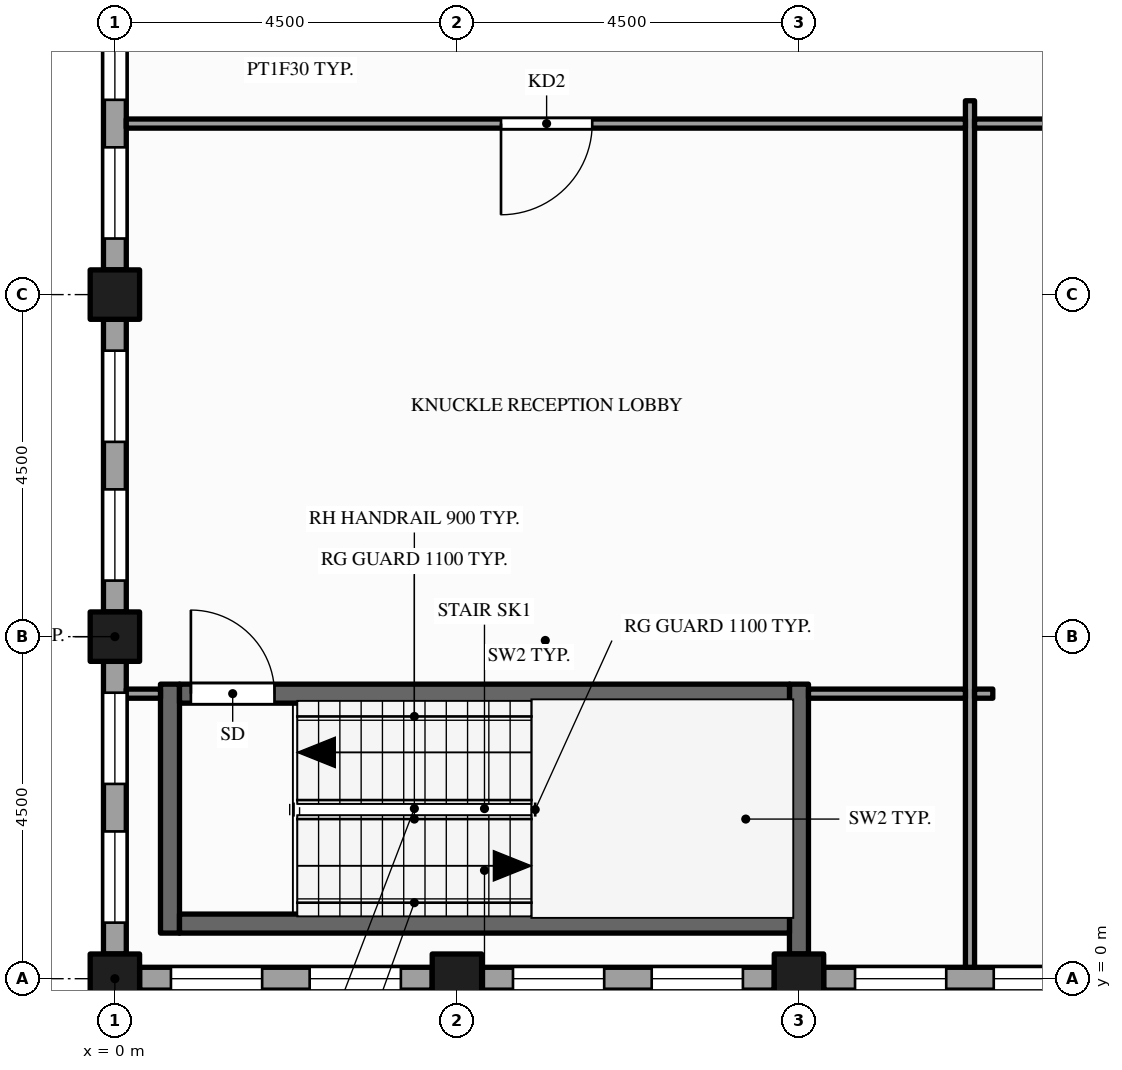
"""IFC4 building model, lengths in metres.
Left out: names, types, materials, properties, quantities, classifications, styles, units other than length and angle.
Written with IfcOpenShell. Run it as: python <this file> out.ifc"""

import sys

from ifc_helpers import new_model, si_unit, direction, frame, frame_2d, origin, origin_2d, place, context, subcontext, project, spatial, rectangle, hollow_rectangle, extrude, element, fill, save


model = new_model("IFC4")
c1 = context("Model", 3, precision=1e-05, world=origin(), true_north=direction((0.0, 1.0)))
c2 = subcontext(c1, "Body", "Model", "MODEL_VIEW")
j1 = project(units=[si_unit("LENGTHUNIT", "METRE"), si_unit("PLANEANGLEUNIT", "RADIAN")], contexts=[c1])
p1 = place(None, origin())
s1 = spatial("IfcSite", under=j1, at=p1, CompositionType="ELEMENT")
p2 = place(p1, origin())
s2 = spatial("IfcBuilding", under=s1, at=p2, CompositionType="ELEMENT")
p3 = place(p2, frame((0.0, 0.0, 261.0)))
s3 = spatial("IfcBuildingStorey", under=s2, at=p3, CompositionType="ELEMENT", Elevation=261.0)
for number, where, z_axis, x_axis in (
    (1, (0.0, 0.0, -0.15), (0.0, 0.0, 1.0), (1.0, 0.0, 0.0)),
    (2, (0.0, 4.5, -0.15), (0.0, 0.0, 1.0), (1.0, 0.0, 0.0)),
    (3, (0.0, 9.0, -0.15), (0.0, 0.0, 1.0), (1.0, 0.0, 0.0)),
    (4, (4.5, 0.0, -0.15), (0.0, 0.0, 1.0), (1.0, 0.0, 0.0)),
    (5, (9.0, 0.0, -0.15), (0.0, 0.0, 1.0), (1.0, 0.0, 0.0)),
):
    element("IfcColumn", number, at=place(p3, frame(where, z_axis=z_axis, x_axis=x_axis)), inside=s3, PredefinedType="COLUMN", context=c2, shape_type="SweptSolid", body=[
        extrude(hollow_rectangle(XDim=0.65, YDim=0.65, WallThickness=0.032, at=origin_2d()), origin(), (0.0, 0.0, 1.0), 4.0),
    ])
p4 = place(p3, frame((0.0, 13.175, 0.0), z_axis=(0.0, 0.0, 1.0), x_axis=(0.0, -1.0, 0.0)))
e6 = element("IfcWall", 6, at=p4, inside=s3, PredefinedType="STANDARD", context=c2, shape_type="SweptSolid", body=[
    extrude(rectangle(XDim=3.85, YDim=0.3, at=frame_2d((1.925, 0.0))), origin(), (0.0, 0.0, 1.0), 3.162),
])
p5 = place(p4, frame((0.413, 0.0, 0.9)))
e7 = element("IfcOpeningElement", 7, at=p5, cuts=e6, PredefinedType="OPENING", context=c2, shape_type="SweptSolid", body=[
    extrude(rectangle(XDim=1.2, YDim=2.0, at=frame_2d((0.6, 1.0))), frame((0.0, 0.16, 0.0), z_axis=(0.0, -1.0, 0.0), x_axis=(1.0, 0.0, 0.0)), (0.0, 0.0, 1.0), 0.32),
])
p6 = place(p4, frame((2.238, 0.0, 0.9)))
e8 = element("IfcOpeningElement", 8, at=p6, cuts=e6, PredefinedType="OPENING", context=c2, shape_type="SweptSolid", body=[
    extrude(rectangle(XDim=1.2, YDim=2.0, at=frame_2d((0.6, 1.0))), frame((0.0, 0.16, 0.0), z_axis=(0.0, -1.0, 0.0), x_axis=(1.0, 0.0, 0.0)), (0.0, 0.0, 1.0), 0.32),
])
p7 = place(p3, frame((0.0, 8.675, 0.0), z_axis=(0.0, 0.0, 1.0), x_axis=(0.0, -1.0, 0.0)))
e9 = element("IfcWall", 9, at=p7, inside=s3, PredefinedType="STANDARD", context=c2, shape_type="SweptSolid", body=[
    extrude(rectangle(XDim=3.85, YDim=0.3, at=frame_2d((1.925, 0.0))), origin(), (0.0, 0.0, 1.0), 3.162),
])
p8 = place(p7, frame((0.413, 0.0, 0.9)))
e10 = element("IfcOpeningElement", 10, at=p8, cuts=e9, PredefinedType="OPENING", context=c2, shape_type="SweptSolid", body=[
    extrude(rectangle(XDim=1.2, YDim=2.0, at=frame_2d((0.6, 1.0))), frame((0.0, 0.16, 0.0), z_axis=(0.0, -1.0, 0.0), x_axis=(1.0, 0.0, 0.0)), (0.0, 0.0, 1.0), 0.32),
])
p9 = place(p7, frame((2.238, 0.0, 0.9)))
e11 = element("IfcOpeningElement", 11, at=p9, cuts=e9, PredefinedType="OPENING", context=c2, shape_type="SweptSolid", body=[
    extrude(rectangle(XDim=1.2, YDim=2.0, at=frame_2d((0.6, 1.0))), frame((0.0, 0.16, 0.0), z_axis=(0.0, -1.0, 0.0), x_axis=(1.0, 0.0, 0.0)), (0.0, 0.0, 1.0), 0.32),
])
p10 = place(p3, frame((0.0, 4.175, 0.0), z_axis=(0.0, 0.0, 1.0), x_axis=(0.0, -1.0, 0.0)))
e12 = element("IfcWall", 12, at=p10, inside=s3, PredefinedType="STANDARD", context=c2, shape_type="SweptSolid", body=[
    extrude(rectangle(XDim=3.85, YDim=0.3, at=frame_2d((1.925, 0.0))), origin(), (0.0, 0.0, 1.0), 3.162),
])
p11 = place(p10, frame((0.413, 0.0, 0.9)))
e13 = element("IfcOpeningElement", 13, at=p11, cuts=e12, PredefinedType="OPENING", context=c2, shape_type="SweptSolid", body=[
    extrude(rectangle(XDim=1.2, YDim=2.0, at=frame_2d((0.6, 1.0))), frame((0.0, 0.16, 0.0), z_axis=(0.0, -1.0, 0.0), x_axis=(1.0, 0.0, 0.0)), (0.0, 0.0, 1.0), 0.32),
])
p12 = place(p10, frame((2.238, 0.0, 0.9)))
e14 = element("IfcOpeningElement", 14, at=p12, cuts=e12, PredefinedType="OPENING", context=c2, shape_type="SweptSolid", body=[
    extrude(rectangle(XDim=1.2, YDim=2.0, at=frame_2d((0.6, 1.0))), frame((0.0, 0.16, 0.0), z_axis=(0.0, -1.0, 0.0), x_axis=(1.0, 0.0, 0.0)), (0.0, 0.0, 1.0), 0.32),
])
p13 = place(p3, frame((0.325, 0.0, 0.0), z_axis=(0.0, 0.0, 1.0), x_axis=(1.0, 0.0, 0.0)))
e15 = element("IfcWall", 15, at=p13, inside=s3, PredefinedType="STANDARD", context=c2, shape_type="SweptSolid", body=[
    extrude(rectangle(XDim=3.85, YDim=0.3, at=frame_2d((1.925, 0.0))), origin(), (0.0, 0.0, 1.0), 3.162),
])
p14 = place(p13, frame((0.413, 0.0, 0.9)))
e16 = element("IfcOpeningElement", 16, at=p14, cuts=e15, PredefinedType="OPENING", context=c2, shape_type="SweptSolid", body=[
    extrude(rectangle(XDim=1.2, YDim=2.0, at=frame_2d((0.6, 1.0))), frame((0.0, 0.16, 0.0), z_axis=(0.0, -1.0, 0.0), x_axis=(1.0, 0.0, 0.0)), (0.0, 0.0, 1.0), 0.32),
])
p15 = place(p13, frame((2.238, 0.0, 0.9)))
e17 = element("IfcOpeningElement", 17, at=p15, cuts=e15, PredefinedType="OPENING", context=c2, shape_type="SweptSolid", body=[
    extrude(rectangle(XDim=1.2, YDim=2.0, at=frame_2d((0.6, 1.0))), frame((0.0, 0.16, 0.0), z_axis=(0.0, -1.0, 0.0), x_axis=(1.0, 0.0, 0.0)), (0.0, 0.0, 1.0), 0.32),
])
p16 = place(p3, frame((4.825, 0.0, 0.0), z_axis=(0.0, 0.0, 1.0), x_axis=(1.0, 0.0, 0.0)))
e18 = element("IfcWall", 18, at=p16, inside=s3, PredefinedType="STANDARD", context=c2, shape_type="SweptSolid", body=[
    extrude(rectangle(XDim=3.85, YDim=0.3, at=frame_2d((1.925, 0.0))), origin(), (0.0, 0.0, 1.0), 3.162),
])
p17 = place(p16, frame((0.413, 0.0, 0.9)))
e19 = element("IfcOpeningElement", 19, at=p17, cuts=e18, PredefinedType="OPENING", context=c2, shape_type="SweptSolid", body=[
    extrude(rectangle(XDim=1.2, YDim=2.0, at=frame_2d((0.6, 1.0))), frame((0.0, 0.16, 0.0), z_axis=(0.0, -1.0, 0.0), x_axis=(1.0, 0.0, 0.0)), (0.0, 0.0, 1.0), 0.32),
])
p18 = place(p16, frame((2.238, 0.0, 0.9)))
e20 = element("IfcOpeningElement", 20, at=p18, cuts=e18, PredefinedType="OPENING", context=c2, shape_type="SweptSolid", body=[
    extrude(rectangle(XDim=1.2, YDim=2.0, at=frame_2d((0.6, 1.0))), frame((0.0, 0.16, 0.0), z_axis=(0.0, -1.0, 0.0), x_axis=(1.0, 0.0, 0.0)), (0.0, 0.0, 1.0), 0.32),
])
p19 = place(p3, frame((9.325, 0.0, 0.0), z_axis=(0.0, 0.0, 1.0), x_axis=(1.0, 0.0, 0.0)))
e21 = element("IfcWall", 21, at=p19, inside=s3, PredefinedType="STANDARD", context=c2, shape_type="SweptSolid", body=[
    extrude(rectangle(XDim=3.85, YDim=0.3, at=frame_2d((1.925, 0.0))), origin(), (0.0, 0.0, 1.0), 2.87),
])
p20 = place(p19, frame((0.413, 0.0, 0.9)))
e22 = element("IfcOpeningElement", 22, at=p20, cuts=e21, PredefinedType="OPENING", context=c2, shape_type="SweptSolid", body=[
    extrude(rectangle(XDim=1.2, YDim=1.75, at=frame_2d((0.6, 0.875))), frame((0.0, 0.16, 0.0), z_axis=(0.0, -1.0, 0.0), x_axis=(1.0, 0.0, 0.0)), (0.0, 0.0, 1.0), 0.32),
])
p21 = place(p19, frame((2.238, 0.0, 0.9)))
e23 = element("IfcOpeningElement", 23, at=p21, cuts=e21, PredefinedType="OPENING", context=c2, shape_type="SweptSolid", body=[
    extrude(rectangle(XDim=1.2, YDim=1.75, at=frame_2d((0.6, 0.875))), frame((0.0, 0.16, 0.0), z_axis=(0.0, -1.0, 0.0), x_axis=(1.0, 0.0, 0.0)), (0.0, 0.0, 1.0), 0.32),
])
p22 = place(p3, frame((0.725, 0.6, 0.0), z_axis=(0.0, 0.0, 1.0), x_axis=(0.0, 1.0, 0.0)))
e24 = element("IfcWall", 24, at=p22, inside=s3, PredefinedType="SHEAR", context=c2, shape_type="SweptSolid", body=[
    extrude(rectangle(XDim=3.275, YDim=0.25, at=frame_2d((1.637, 0.0))), origin(), (0.0, 0.0, 1.0), 3.85),
])
p23 = place(p3, frame((9.0, 0.325, 0.0), z_axis=(0.0, 0.0, 1.0), x_axis=(0.0, 1.0, 0.0)))
e25 = element("IfcWall", 25, at=p23, inside=s3, PredefinedType="SHEAR", context=c2, shape_type="SweptSolid", body=[
    extrude(rectangle(XDim=3.55, YDim=0.25, at=frame_2d((1.775, 0.0))), origin(), (0.0, 0.0, 1.0), 3.85),
])
p24 = place(p3, frame((11.25, 0.15, 0.0), z_axis=(0.0, 0.0, 1.0), x_axis=(0.0, 1.0, 0.0)))
e26 = element("IfcWall", 26, at=p24, inside=s3, PredefinedType="PARTITIONING", context=c2, shape_type="SweptSolid", body=[
    extrude(rectangle(XDim=11.4, YDim=0.12, at=frame_2d((5.7, 0.0))), origin(), (0.0, 0.0, 1.0), 2.87),
])
p25 = place(p3, frame((0.85, 0.725, 0.0), z_axis=(0.0, 0.0, 1.0), x_axis=(1.0, 0.0, 0.0)))
e27 = element("IfcWall", 27, at=p25, inside=s3, PredefinedType="SHEAR", context=c2, shape_type="SweptSolid", body=[
    extrude(rectangle(XDim=8.025, YDim=0.25, at=frame_2d((4.012, 0.0))), origin(), (0.0, 0.0, 1.0), 3.85),
])
p26 = place(p3, frame((0.15, 3.75, 0.0), z_axis=(0.0, 0.0, 1.0), x_axis=(1.0, 0.0, 0.0)))
e28 = element("IfcWall", 28, at=p26, inside=s3, PredefinedType="PARTITIONING", context=c2, shape_type="SweptSolid", body=[
    extrude(rectangle(XDim=0.45, YDim=0.12, at=frame_2d((0.225, 0.0))), origin(), (0.0, 0.0, 1.0), 3.85),
])
p27 = place(p3, frame((0.85, 3.75, 0.0), z_axis=(0.0, 0.0, 1.0), x_axis=(1.0, 0.0, 0.0)))
e29 = element("IfcWall", 29, at=p27, inside=s3, PredefinedType="SHEAR", context=c2, shape_type="SweptSolid", body=[
    extrude(rectangle(XDim=8.025, YDim=0.25, at=frame_2d((4.012, 0.0))), origin(), (0.0, 0.0, 1.0), 3.85),
])
p28 = place(p27, frame((0.15, 0.0, 0.0)))
e30 = element("IfcOpeningElement", 30, at=p28, cuts=e29, PredefinedType="OPENING", context=c2, shape_type="SweptSolid", body=[
    extrude(rectangle(XDim=1.1, YDim=2.1, at=frame_2d((0.55, 1.05))), frame((0.0, 0.135, 0.0), z_axis=(0.0, -1.0, 0.0), x_axis=(1.0, 0.0, 0.0)), (0.0, 0.0, 1.0), 0.27),
])
p29 = place(p3, frame((9.125, 3.75, 0.0), z_axis=(0.0, 0.0, 1.0), x_axis=(1.0, 0.0, 0.0)))
e31 = element("IfcWall", 31, at=p29, inside=s3, PredefinedType="PARTITIONING", context=c2, shape_type="SweptSolid", body=[
    extrude(rectangle(XDim=2.065, YDim=0.12, at=frame_2d((1.032, 0.0))), origin(), (0.0, 0.0, 1.0), 2.87),
])
p30 = place(p3, frame((11.31, 3.75, 0.0), z_axis=(0.0, 0.0, 1.0), x_axis=(1.0, 0.0, 0.0)))
e32 = element("IfcWall", 32, at=p30, inside=s3, PredefinedType="PARTITIONING", context=c2, shape_type="SweptSolid", body=[
    extrude(rectangle(XDim=0.24, YDim=0.12, at=frame_2d((0.12, 0.0))), origin(), (0.0, 0.0, 1.0), 2.87),
])
p31 = place(p3, frame((0.15, 11.25, 0.0), z_axis=(0.0, 0.0, 1.0), x_axis=(1.0, 0.0, 0.0)))
e33 = element("IfcWall", 33, at=p31, inside=s3, PredefinedType="PARTITIONING", context=c2, shape_type="SweptSolid", body=[
    extrude(rectangle(XDim=11.04, YDim=0.12, at=frame_2d((5.52, 0.0))), origin(), (0.0, 0.0, 1.0), 2.87),
])
p32 = place(p31, frame((4.93, 0.0, 0.0)))
e34 = element("IfcOpeningElement", 34, at=p32, cuts=e33, PredefinedType="OPENING", context=c2, shape_type="SweptSolid", body=[
    extrude(rectangle(XDim=1.2, YDim=2.1, at=frame_2d((0.6, 1.05))), frame((0.0, 0.07, 0.0), z_axis=(0.0, -1.0, 0.0), x_axis=(1.0, 0.0, 0.0)), (0.0, 0.0, 1.0), 0.14),
])
p33 = place(p3, frame((11.31, 11.25, 0.0), z_axis=(0.0, 0.0, 1.0), x_axis=(1.0, 0.0, 0.0)))
e35 = element("IfcWall", 35, at=p33, inside=s3, PredefinedType="PARTITIONING", context=c2, shape_type="SweptSolid", body=[
    extrude(rectangle(XDim=8.88, YDim=0.12, at=frame_2d((4.44, 0.0))), origin(), (0.0, 0.0, 1.0), 2.87),
])
p34 = place(p33, frame((3.94, 0.0, 0.0)))
e36 = element("IfcOpeningElement", 36, at=p34, cuts=e35, PredefinedType="OPENING", context=c2, shape_type="SweptSolid", body=[
    extrude(rectangle(XDim=1.0, YDim=2.1, at=frame_2d((0.5, 1.05))), frame((0.0, 0.07, 0.0), z_axis=(0.0, -1.0, 0.0), x_axis=(1.0, 0.0, 0.0)), (0.0, 0.0, 1.0), 0.14),
])
p35 = place(p5, origin())
e37 = element("IfcWindow", 37, at=p35, inside=s3, PartitioningType="SINGLE_PANEL", PredefinedType="WINDOW", context=c2, shape_type="SweptSolid", body=[
    extrude(rectangle(XDim=1.2, YDim=2.0, at=frame_2d((0.6, 1.0))), frame((0.0, 0.03, 0.0), z_axis=(0.0, -1.0, 0.0), x_axis=(1.0, 0.0, 0.0)), (0.0, 0.0, 1.0), 0.06),
])
fill(e7, e37)
p36 = place(p6, origin())
e38 = element("IfcWindow", 38, at=p36, inside=s3, PartitioningType="SINGLE_PANEL", PredefinedType="WINDOW", context=c2, shape_type="SweptSolid", body=[
    extrude(rectangle(XDim=1.2, YDim=2.0, at=frame_2d((0.6, 1.0))), frame((0.0, 0.03, 0.0), z_axis=(0.0, -1.0, 0.0), x_axis=(1.0, 0.0, 0.0)), (0.0, 0.0, 1.0), 0.06),
])
fill(e8, e38)
p37 = place(p8, origin())
e39 = element("IfcWindow", 39, at=p37, inside=s3, PartitioningType="SINGLE_PANEL", PredefinedType="WINDOW", context=c2, shape_type="SweptSolid", body=[
    extrude(rectangle(XDim=1.2, YDim=2.0, at=frame_2d((0.6, 1.0))), frame((0.0, 0.03, 0.0), z_axis=(0.0, -1.0, 0.0), x_axis=(1.0, 0.0, 0.0)), (0.0, 0.0, 1.0), 0.06),
])
fill(e10, e39)
p38 = place(p9, origin())
e40 = element("IfcWindow", 40, at=p38, inside=s3, PartitioningType="SINGLE_PANEL", PredefinedType="WINDOW", context=c2, shape_type="SweptSolid", body=[
    extrude(rectangle(XDim=1.2, YDim=2.0, at=frame_2d((0.6, 1.0))), frame((0.0, 0.03, 0.0), z_axis=(0.0, -1.0, 0.0), x_axis=(1.0, 0.0, 0.0)), (0.0, 0.0, 1.0), 0.06),
])
fill(e11, e40)
p39 = place(p11, origin())
e41 = element("IfcWindow", 41, at=p39, inside=s3, PartitioningType="SINGLE_PANEL", PredefinedType="WINDOW", context=c2, shape_type="SweptSolid", body=[
    extrude(rectangle(XDim=1.2, YDim=2.0, at=frame_2d((0.6, 1.0))), frame((0.0, 0.03, 0.0), z_axis=(0.0, -1.0, 0.0), x_axis=(1.0, 0.0, 0.0)), (0.0, 0.0, 1.0), 0.06),
])
fill(e13, e41)
p40 = place(p12, origin())
e42 = element("IfcWindow", 42, at=p40, inside=s3, PartitioningType="SINGLE_PANEL", PredefinedType="WINDOW", context=c2, shape_type="SweptSolid", body=[
    extrude(rectangle(XDim=1.2, YDim=2.0, at=frame_2d((0.6, 1.0))), frame((0.0, 0.03, 0.0), z_axis=(0.0, -1.0, 0.0), x_axis=(1.0, 0.0, 0.0)), (0.0, 0.0, 1.0), 0.06),
])
fill(e14, e42)
p41 = place(p14, origin())
e43 = element("IfcWindow", 43, at=p41, inside=s3, PartitioningType="SINGLE_PANEL", PredefinedType="WINDOW", context=c2, shape_type="SweptSolid", body=[
    extrude(rectangle(XDim=1.2, YDim=2.0, at=frame_2d((0.6, 1.0))), frame((0.0, 0.03, 0.0), z_axis=(0.0, -1.0, 0.0), x_axis=(1.0, 0.0, 0.0)), (0.0, 0.0, 1.0), 0.06),
])
fill(e16, e43)
p42 = place(p15, origin())
e44 = element("IfcWindow", 44, at=p42, inside=s3, PartitioningType="SINGLE_PANEL", PredefinedType="WINDOW", context=c2, shape_type="SweptSolid", body=[
    extrude(rectangle(XDim=1.2, YDim=2.0, at=frame_2d((0.6, 1.0))), frame((0.0, 0.03, 0.0), z_axis=(0.0, -1.0, 0.0), x_axis=(1.0, 0.0, 0.0)), (0.0, 0.0, 1.0), 0.06),
])
fill(e17, e44)
p43 = place(p17, origin())
e45 = element("IfcWindow", 45, at=p43, inside=s3, PartitioningType="SINGLE_PANEL", PredefinedType="WINDOW", context=c2, shape_type="SweptSolid", body=[
    extrude(rectangle(XDim=1.2, YDim=2.0, at=frame_2d((0.6, 1.0))), frame((0.0, 0.03, 0.0), z_axis=(0.0, -1.0, 0.0), x_axis=(1.0, 0.0, 0.0)), (0.0, 0.0, 1.0), 0.06),
])
fill(e19, e45)
p44 = place(p18, origin())
e46 = element("IfcWindow", 46, at=p44, inside=s3, PartitioningType="SINGLE_PANEL", PredefinedType="WINDOW", context=c2, shape_type="SweptSolid", body=[
    extrude(rectangle(XDim=1.2, YDim=2.0, at=frame_2d((0.6, 1.0))), frame((0.0, 0.03, 0.0), z_axis=(0.0, -1.0, 0.0), x_axis=(1.0, 0.0, 0.0)), (0.0, 0.0, 1.0), 0.06),
])
fill(e20, e46)
p45 = place(p20, origin())
e47 = element("IfcWindow", 47, at=p45, inside=s3, PartitioningType="SINGLE_PANEL", PredefinedType="WINDOW", context=c2, shape_type="SweptSolid", body=[
    extrude(rectangle(XDim=1.2, YDim=1.75, at=frame_2d((0.6, 0.875))), frame((0.0, 0.03, 0.0), z_axis=(0.0, -1.0, 0.0), x_axis=(1.0, 0.0, 0.0)), (0.0, 0.0, 1.0), 0.06),
])
fill(e22, e47)
p46 = place(p21, origin())
e48 = element("IfcWindow", 48, at=p46, inside=s3, PartitioningType="SINGLE_PANEL", PredefinedType="WINDOW", context=c2, shape_type="SweptSolid", body=[
    extrude(rectangle(XDim=1.2, YDim=1.75, at=frame_2d((0.6, 0.875))), frame((0.0, 0.03, 0.0), z_axis=(0.0, -1.0, 0.0), x_axis=(1.0, 0.0, 0.0)), (0.0, 0.0, 1.0), 0.06),
])
fill(e23, e48)
p47 = place(p28, origin())
e49 = element("IfcDoor", 49, at=p47, inside=s3, OperationType="SINGLE_SWING_LEFT", PredefinedType="DOOR", context=c2, shape_type="SweptSolid", body=[
    extrude(rectangle(XDim=1.1, YDim=2.1, at=frame_2d((0.55, 1.05))), frame((0.0, 0.025, 0.0), z_axis=(0.0, -1.0, 0.0), x_axis=(1.0, 0.0, 0.0)), (0.0, 0.0, 1.0), 0.05),
])
fill(e30, e49)
p48 = place(p32, origin())
e50 = element("IfcDoor", 50, at=p48, inside=s3, OperationType="SINGLE_SWING_LEFT", PredefinedType="DOOR", context=c2, shape_type="SweptSolid", body=[
    extrude(rectangle(XDim=1.2, YDim=2.1, at=frame_2d((0.6, 1.05))), frame((0.0, 0.025, 0.0), z_axis=(0.0, -1.0, 0.0), x_axis=(1.0, 0.0, 0.0)), (0.0, 0.0, 1.0), 0.05),
])
fill(e34, e50)
save(model, sys.argv[1])
